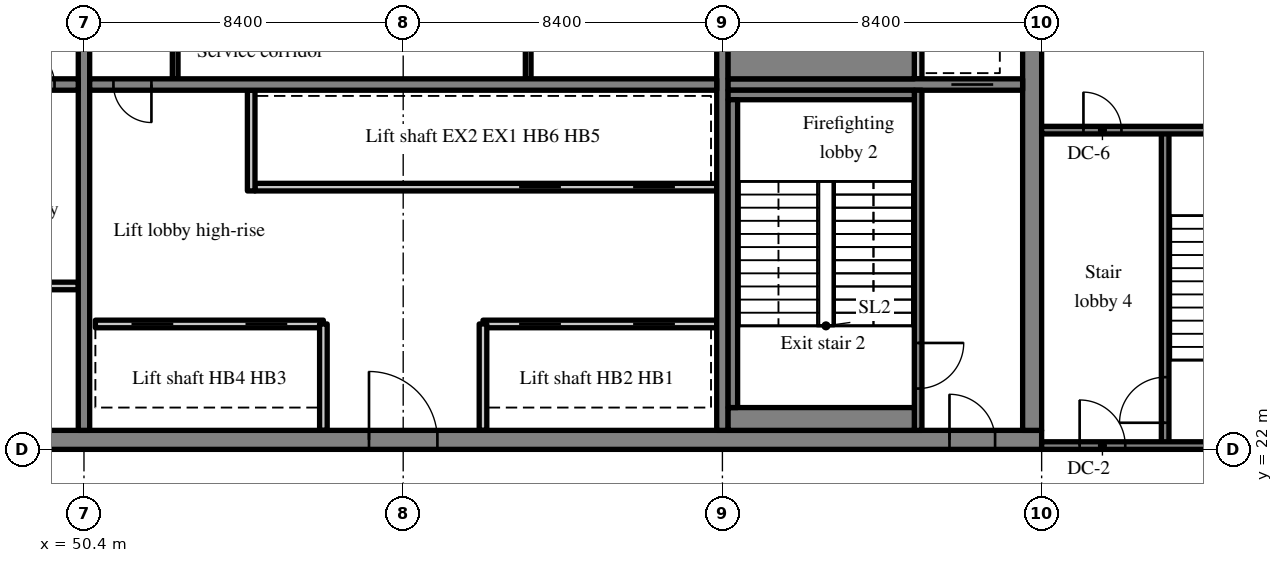
"""IFC4 building model, lengths in metres.
Left out: names, types, materials, properties, quantities, classifications, styles, units other than length and angle.
Written with IfcOpenShell. Run it as: python <this file> out.ifc"""

import sys

from ifc_helpers import new_model, si_unit, direction, frame, frame_2d, origin, place, context, subcontext, project, spatial, rectangle, extrude, source, transform, mapped, element, fill, save


model = new_model("IFC4")
c1 = context("Model", 3, precision=1e-05, world=origin(), true_north=direction((0.0, 1.0)))
c2 = subcontext(c1, "Body", "Model", "MODEL_VIEW")
j1 = project(units=[si_unit("LENGTHUNIT", "METRE"), si_unit("PLANEANGLEUNIT", "RADIAN")], contexts=[c1])
p1 = place(None, origin())
s1 = spatial("IfcSite", under=j1, at=p1, CompositionType="ELEMENT")
p2 = place(p1, origin())
s2 = spatial("IfcBuilding", under=s1, at=p2, CompositionType="ELEMENT")
p3 = place(p2, frame((0.0, 0.0, 313.7)))
s3 = spatial("IfcBuildingStorey", under=s2, at=p3, CompositionType="ELEMENT", Elevation=313.7)
m1 = source(origin(), c2, "Body", "SweptSolid", [
    extrude(rectangle(XDim=50.4, YDim=0.5, at=frame_2d((25.2, 0.0))), origin(), (0.0, 0.0, 1.0), 3.72),
])
p4 = place(p3, frame((25.2, 22.25, 0.0), z_axis=(0.0, 0.0, 1.0), x_axis=(1.0, 0.0, 0.0)))
e1 = element("IfcWall", 1, at=p4, inside=s3, PredefinedType="SHEAR", context=c2, shape_type="MappedRepresentation", body=[
    mapped(m1, transform((0.0, 0.0, 0.0), scale=1.0)),
])
m2 = source(origin(), c2, "Body", "SweptSolid", [
    extrude(rectangle(XDim=1.8, YDim=2.1, at=frame_2d((0.9, 1.05))), frame((0.0, 0.26, 0.0), z_axis=(0.0, -1.0, 0.0), x_axis=(1.0, 0.0, 0.0)), (0.0, 0.0, 1.0), 0.52),
])
p5 = place(p4, frame((15.9, 0.0, 0.0)))
e2 = element("IfcOpeningElement", 2, at=p5, cuts=e1, PredefinedType="OPENING", context=c2, shape_type="MappedRepresentation", body=[
    mapped(m2, transform((0.0, 0.0, 0.0), scale=1.0)),
])
m3 = source(origin(), c2, "Body", "SweptSolid", [
    extrude(rectangle(XDim=0.9, YDim=2.1, at=frame_2d((0.45, 1.05))), frame((0.0, 0.26, 0.0), z_axis=(0.0, -1.0, 0.0), x_axis=(1.0, 0.0, 0.0)), (0.0, 0.0, 1.0), 0.52),
])
p6 = place(p4, frame((9.675, 0.0, 0.0)))
e3 = element("IfcOpeningElement", 3, at=p6, cuts=e1, PredefinedType="OPENING", context=c2, shape_type="MappedRepresentation", body=[
    mapped(m3, transform((0.0, 0.0, 0.0), scale=1.0)),
])
p7 = place(p4, frame((21.525, 0.0, 0.0)))
e4 = element("IfcOpeningElement", 4, at=p7, cuts=e1, PredefinedType="OPENING", context=c2, shape_type="MappedRepresentation", body=[
    mapped(m3, transform((0.0, 0.0, 0.0), scale=1.0)),
])
p8 = place(p4, frame((32.7, 0.0, 0.0)))
e5 = element("IfcOpeningElement", 5, at=p8, cuts=e1, PredefinedType="OPENING", context=c2, shape_type="MappedRepresentation", body=[
    mapped(m2, transform((0.0, 0.0, 0.0), scale=1.0)),
])
m4 = source(origin(), c2, "Body", "SweptSolid", [
    extrude(rectangle(XDim=1.2, YDim=2.1, at=frame_2d((0.6, 1.05))), frame((0.0, 0.26, 0.0), z_axis=(0.0, -1.0, 0.0), x_axis=(1.0, 0.0, 0.0)), (0.0, 0.0, 1.0), 0.52),
])
p9 = place(p4, frame((6.5, 0.0, 0.0)))
e6 = element("IfcOpeningElement", 6, at=p9, cuts=e1, PredefinedType="OPENING", context=c2, shape_type="MappedRepresentation", body=[
    mapped(m4, transform((0.0, 0.0, 0.0), scale=1.0)),
])
p10 = place(p4, frame((47.975, 0.0, 0.0)))
e7 = element("IfcOpeningElement", 7, at=p10, cuts=e1, PredefinedType="OPENING", context=c2, shape_type="MappedRepresentation", body=[
    mapped(m4, transform((0.0, 0.0, 0.0), scale=1.0)),
])
m5 = source(origin(), c2, "Body", "SweptSolid", [
    extrude(rectangle(XDim=19.0, YDim=0.5, at=frame_2d((9.5, 0.0))), origin(), (0.0, 0.0, 1.0), 3.72),
])
p11 = place(p3, frame((75.35, 22.5, 0.0), z_axis=(0.0, 0.0, 1.0), x_axis=(0.0, 1.0, 0.0)))
e8 = element("IfcWall", 8, at=p11, inside=s3, PredefinedType="SHEAR", context=c2, shape_type="MappedRepresentation", body=[
    mapped(m5, transform((0.0, 0.0, 0.0), scale=1.0)),
])
p12 = place(p11, frame((12.9, 0.0, 0.0)))
e9 = element("IfcOpeningElement", 9, at=p12, cuts=e8, PredefinedType="OPENING", context=c2, shape_type="MappedRepresentation", body=[
    mapped(m4, transform((0.0, 0.0, 0.0), scale=1.0)),
])
m6 = source(origin(), c2, "Body", "SweptSolid", [
    extrude(rectangle(XDim=19.0, YDim=0.3, at=frame_2d((9.5, 0.0))), origin(), (0.0, 0.0, 1.0), 3.72),
])
p13 = place(p3, frame((50.4, 22.5, 0.0), z_axis=(0.0, 0.0, 1.0), x_axis=(0.0, 1.0, 0.0)))
e10 = element("IfcWall", 10, at=p13, inside=s3, PredefinedType="SHEAR", context=c2, shape_type="MappedRepresentation", body=[
    mapped(m6, transform((0.0, 0.0, 0.0), scale=1.0)),
])
m7 = source(origin(), c2, "Body", "SweptSolid", [
    extrude(rectangle(XDim=1.1, YDim=2.1, at=frame_2d((0.55, 1.05))), frame((0.0, 0.16, 0.0), z_axis=(0.0, -1.0, 0.0), x_axis=(1.0, 0.0, 0.0)), (0.0, 0.0, 1.0), 0.32),
])
p14 = place(p13, frame((12.95, 0.0, 0.0)))
e11 = element("IfcOpeningElement", 11, at=p14, cuts=e10, PredefinedType="OPENING", context=c2, shape_type="MappedRepresentation", body=[
    mapped(m7, transform((0.0, 0.0, 0.0), scale=1.0)),
])
p15 = place(p3, frame((67.2, 22.5, 0.0), z_axis=(0.0, 0.0, 1.0), x_axis=(0.0, 1.0, 0.0)))
e12 = element("IfcWall", 12, at=p15, inside=s3, PredefinedType="SHEAR", context=c2, shape_type="MappedRepresentation", body=[
    mapped(m6, transform((0.0, 0.0, 0.0), scale=1.0)),
])
m8 = source(origin(), c2, "Body", "SweptSolid", [
    extrude(rectangle(XDim=16.5, YDim=0.3, at=frame_2d((8.25, 0.0))), origin(), (0.0, 0.0, 1.0), 3.72),
])
p16 = place(p3, frame((33.75, 31.6, 0.0), z_axis=(0.0, 0.0, 1.0), x_axis=(1.0, 0.0, 0.0)))
e13 = element("IfcWall", 13, at=p16, inside=s3, PredefinedType="SHEAR", context=c2, shape_type="MappedRepresentation", body=[
    mapped(m8, transform((0.0, 0.0, 0.0), scale=1.0)),
])
m9 = source(origin(), c2, "Body", "SweptSolid", [
    extrude(rectangle(XDim=1.0, YDim=2.1, at=frame_2d((0.5, 1.05))), frame((0.0, 0.16, 0.0), z_axis=(0.0, -1.0, 0.0), x_axis=(1.0, 0.0, 0.0)), (0.0, 0.0, 1.0), 0.32),
])
p17 = place(p16, frame((14.875, 0.0, 0.0)))
e14 = element("IfcOpeningElement", 14, at=p17, cuts=e13, PredefinedType="OPENING", context=c2, shape_type="MappedRepresentation", body=[
    mapped(m9, transform((0.0, 0.0, 0.0), scale=1.0)),
])
p18 = place(p3, frame((50.55, 31.6, 0.0), z_axis=(0.0, 0.0, 1.0), x_axis=(1.0, 0.0, 0.0)))
e15 = element("IfcWall", 15, at=p18, inside=s3, PredefinedType="SHEAR", context=c2, shape_type="MappedRepresentation", body=[
    mapped(m8, transform((0.0, 0.0, 0.0), scale=1.0)),
])
p19 = place(p18, frame((0.625, 0.0, 0.0)))
e16 = element("IfcOpeningElement", 16, at=p19, cuts=e15, PredefinedType="OPENING", context=c2, shape_type="MappedRepresentation", body=[
    mapped(m9, transform((0.0, 0.0, 0.0), scale=1.0)),
])
m10 = source(origin(), c2, "Body", "SweptSolid", [
    extrude(rectangle(XDim=7.75, YDim=0.3, at=frame_2d((3.875, 0.0))), origin(), (0.0, 0.0, 1.0), 3.72),
])
p20 = place(p3, frame((67.35, 31.6, 0.0), z_axis=(0.0, 0.0, 1.0), x_axis=(1.0, 0.0, 0.0)))
e17 = element("IfcWall", 17, at=p20, inside=s3, PredefinedType="SHEAR", context=c2, shape_type="MappedRepresentation", body=[
    mapped(m10, transform((0.0, 0.0, 0.0), scale=1.0)),
])
p21 = place(p20, frame((5.875, 0.0, 0.0)))
e18 = element("IfcOpeningElement", 18, at=p21, cuts=e17, PredefinedType="OPENING", context=c2, shape_type="MappedRepresentation", body=[
    mapped(m7, transform((0.0, 0.0, 0.0), scale=1.0)),
])
m11 = source(origin(), c2, "Body", "SweptSolid", [
    extrude(rectangle(XDim=6.15, YDim=0.2, at=frame_2d((3.075, 0.0))), origin(), (0.0, 0.0, 1.0), 3.72),
])
p22 = place(p3, frame((44.1, 26.3, 0.0), z_axis=(0.0, 0.0, 1.0), x_axis=(1.0, 0.0, 0.0)))
e19 = element("IfcWall", 19, at=p22, inside=s3, PredefinedType="PARTITIONING", context=c2, shape_type="MappedRepresentation", body=[
    mapped(m11, transform((0.0, 0.0, 0.0), scale=1.0)),
])
m12 = source(origin(), c2, "Body", "SweptSolid", [
    extrude(rectangle(XDim=6.15, YDim=0.2, at=frame_2d((3.075, 0.0))), origin(), (0.0, 0.0, 1.0), 3.72),
])
p23 = place(p3, frame((67.05, 25.3, 0.0), z_axis=(0.0, 0.0, 1.0), x_axis=(-1.0, 0.0, 0.0)))
e20 = element("IfcWall", 20, at=p23, inside=s3, PredefinedType="SOLIDWALL", context=c2, shape_type="MappedRepresentation", body=[
    mapped(m12, transform((0.0, 0.0, 0.0), scale=1.0)),
])
m13 = source(origin(), c2, "Body", "SweptSolid", [
    extrude(rectangle(XDim=1.1, YDim=2.1, at=frame_2d((0.55, 1.05))), frame((0.0, 0.11, 0.0), z_axis=(0.0, -1.0, 0.0), x_axis=(1.0, 0.0, 0.0)), (0.0, 0.0, 1.0), 0.22),
])
p24 = place(p23, frame((1.1, 0.0, 0.0)))
e21 = element("IfcOpeningElement", 21, at=p24, cuts=e20, PredefinedType="OPENING", context=c2, shape_type="MappedRepresentation", body=[
    mapped(m13, transform((0.0, 0.0, 0.0), scale=1.0)),
])
p25 = place(p23, frame((4.1, 0.0, 0.0)))
e22 = element("IfcOpeningElement", 22, at=p25, cuts=e20, PredefinedType="OPENING", context=c2, shape_type="MappedRepresentation", body=[
    mapped(m13, transform((0.0, 0.0, 0.0), scale=1.0)),
])
m14 = source(origin(), c2, "Body", "SweptSolid", [
    extrude(rectangle(XDim=6.0, YDim=0.2, at=frame_2d((3.0, 0.0))), origin(), (0.0, 0.0, 1.0), 3.72),
])
p26 = place(p3, frame((56.7, 25.3, 0.0), z_axis=(0.0, 0.0, 1.0), x_axis=(-1.0, 0.0, 0.0)))
e23 = element("IfcWall", 23, at=p26, inside=s3, PredefinedType="SOLIDWALL", context=c2, shape_type="MappedRepresentation", body=[
    mapped(m14, transform((0.0, 0.0, 0.0), scale=1.0)),
])
p27 = place(p26, frame((0.95, 0.0, 0.0)))
e24 = element("IfcOpeningElement", 24, at=p27, cuts=e23, PredefinedType="OPENING", context=c2, shape_type="MappedRepresentation", body=[
    mapped(m13, transform((0.0, 0.0, 0.0), scale=1.0)),
])
p28 = place(p26, frame((3.95, 0.0, 0.0)))
e25 = element("IfcOpeningElement", 25, at=p28, cuts=e23, PredefinedType="OPENING", context=c2, shape_type="MappedRepresentation", body=[
    mapped(m13, transform((0.0, 0.0, 0.0), scale=1.0)),
])
m15 = source(origin(), c2, "Body", "SweptSolid", [
    extrude(rectangle(XDim=12.15, YDim=0.2, at=frame_2d((6.075, 0.0))), origin(), (0.0, 0.0, 1.0), 3.72),
])
p29 = place(p3, frame((67.05, 28.9, 0.0), z_axis=(0.0, 0.0, 1.0), x_axis=(-1.0, 0.0, 0.0)))
e26 = element("IfcWall", 26, at=p29, inside=s3, PredefinedType="SOLIDWALL", context=c2, shape_type="MappedRepresentation", body=[
    mapped(m15, transform((0.0, 0.0, 0.0), scale=1.0)),
])
p30 = place(p29, frame((1.1, 0.0, 0.0)))
e27 = element("IfcOpeningElement", 27, at=p30, cuts=e26, PredefinedType="OPENING", context=c2, shape_type="MappedRepresentation", body=[
    mapped(m13, transform((0.0, 0.0, 0.0), scale=1.0)),
])
p31 = place(p29, frame((4.1, 0.0, 0.0)))
e28 = element("IfcOpeningElement", 28, at=p31, cuts=e26, PredefinedType="OPENING", context=c2, shape_type="MappedRepresentation", body=[
    mapped(m13, transform((0.0, 0.0, 0.0), scale=1.0)),
])
m16 = source(origin(), c2, "Body", "SweptSolid", [
    extrude(rectangle(XDim=2.8, YDim=0.2, at=frame_2d((1.4, 0.0))), origin(), (0.0, 0.0, 1.0), 3.72),
])
for number, where, z_axis, x_axis in (
    (29, (60.9, 22.5, 0.0), (0.0, 0.0, 1.0), (0.0, 1.0, 0.0)),
    (30, (56.7, 22.5, 0.0), (0.0, 0.0, 1.0), (0.0, 1.0, 0.0)),
):
    element("IfcWall", number, at=place(p3, frame(where, z_axis=z_axis, x_axis=x_axis)), inside=s3, PredefinedType="SOLIDWALL", context=c2, shape_type="MappedRepresentation", body=[
        mapped(m16, transform((0.0, 0.0, 0.0), scale=1.0)),
    ])
m17 = source(origin(), c2, "Body", "SweptSolid", [
    extrude(rectangle(XDim=2.65, YDim=0.2, at=frame_2d((1.325, 0.0))), origin(), (0.0, 0.0, 1.0), 3.72),
])
p32 = place(p3, frame((54.8, 28.8, 0.0), z_axis=(0.0, 0.0, 1.0), x_axis=(0.0, 1.0, 0.0)))
e31 = element("IfcWall", 31, at=p32, inside=s3, PredefinedType="SOLIDWALL", context=c2, shape_type="MappedRepresentation", body=[
    mapped(m17, transform((0.0, 0.0, 0.0), scale=1.0)),
])
m18 = source(origin(), c2, "Body", "SweptSolid", [
    extrude(rectangle(XDim=3.25, YDim=0.15, at=frame_2d((1.625, 0.0))), origin(), (0.0, 0.0, 1.0), 3.72),
])
for number, where, z_axis, x_axis in (
    (32, (52.8, 31.75, 0.0), (0.0, 0.0, 1.0), (0.0, 1.0, 0.0)),
    (33, (62.089, 31.75, 0.0), (0.0, 0.0, 1.0), (0.0, 1.0, 0.0)),
):
    element("IfcWall", number, at=place(p3, frame(where, z_axis=z_axis, x_axis=x_axis)), inside=s3, PredefinedType="PARTITIONING", context=c2, shape_type="MappedRepresentation", body=[
        mapped(m18, transform((0.0, 0.0, 0.0), scale=1.0)),
    ])
m19 = source(origin(), c2, "Body", "SweptSolid", [
    extrude(rectangle(XDim=8.95, YDim=0.2, at=frame_2d((4.475, 0.0))), origin(), (0.0, 0.0, 1.0), 3.72),
])
p33 = place(p3, frame((72.35, 22.5, 0.0), z_axis=(0.0, 0.0, 1.0), x_axis=(0.0, 1.0, 0.0)))
e34 = element("IfcWall", 34, at=p33, inside=s3, PredefinedType="SOLIDWALL", context=c2, shape_type="MappedRepresentation", body=[
    mapped(m19, transform((0.0, 0.0, 0.0), scale=1.0)),
])
m20 = source(origin(), c2, "Body", "SweptSolid", [
    extrude(rectangle(XDim=1.2, YDim=2.1, at=frame_2d((0.6, 1.05))), frame((0.0, 0.11, 0.0), z_axis=(0.0, -1.0, 0.0), x_axis=(1.0, 0.0, 0.0)), (0.0, 0.0, 1.0), 0.22),
])
p34 = place(p33, frame((1.1, 0.0, 0.0)))
e35 = element("IfcOpeningElement", 35, at=p34, cuts=e34, PredefinedType="OPENING", context=c2, shape_type="MappedRepresentation", body=[
    mapped(m20, transform((0.0, 0.0, 0.0), scale=1.0)),
])
m21 = source(origin(), c2, "Body", "SweptSolid", [
    extrude(rectangle(XDim=1.85, YDim=0.2, at=frame_2d((0.925, 0.0))), origin(), (0.0, 0.0, 1.0), 3.72),
])
p35 = place(p3, frame((72.35, 31.75, 0.0), z_axis=(0.0, 0.0, 1.0), x_axis=(0.0, 1.0, 0.0)))
e36 = element("IfcWall", 36, at=p35, inside=s3, PredefinedType="SOLIDWALL", context=c2, shape_type="MappedRepresentation", body=[
    mapped(m21, transform((0.0, 0.0, 0.0), scale=1.0)),
])
m22 = source(origin(), c2, "Body", "SweptSolid", [
    extrude(rectangle(XDim=8.3, YDim=0.2, at=frame_2d((4.15, 0.0))), origin(), (0.0, 0.0, 1.0), 3.72),
])
p36 = place(p3, frame((78.85, 22.1, 0.0), z_axis=(0.0, 0.0, 1.0), x_axis=(0.0, 1.0, 0.0)))
e37 = element("IfcWall", 37, at=p36, inside=s3, PredefinedType="SOLIDWALL", context=c2, shape_type="MappedRepresentation", body=[
    mapped(m22, transform((0.0, 0.0, 0.0), scale=1.0)),
])
p37 = place(p36, frame((0.6, 0.0, 0.0)))
e38 = element("IfcOpeningElement", 38, at=p37, cuts=e37, PredefinedType="OPENING", context=c2, shape_type="MappedRepresentation", body=[
    mapped(m20, transform((0.0, 0.0, 0.0), scale=1.0)),
])
m23 = source(origin(), c2, "Body", "SweptSolid", [
    extrude(rectangle(XDim=8.15, YDim=0.2, at=frame_2d((4.075, 0.0))), origin(), (0.0, 0.0, 1.0), 3.72),
])
p38 = place(p3, frame((83.75, 22.1, 0.0), z_axis=(0.0, 0.0, 1.0), x_axis=(-1.0, 0.0, 0.0)))
e39 = element("IfcWall", 39, at=p38, inside=s3, PredefinedType="SOLIDWALL", context=c2, shape_type="MappedRepresentation", body=[
    mapped(m23, transform((0.0, 0.0, 0.0), scale=1.0)),
])
p39 = place(p38, frame((5.95, 0.0, 0.0)))
e40 = element("IfcOpeningElement", 40, at=p39, cuts=e39, PredefinedType="OPENING", context=c2, shape_type="MappedRepresentation", body=[
    mapped(m20, transform((0.0, 0.0, 0.0), scale=1.0)),
])
p40 = place(p3, frame((83.75, 30.4, 0.0), z_axis=(0.0, 0.0, 1.0), x_axis=(-1.0, 0.0, 0.0)))
e41 = element("IfcWall", 41, at=p40, inside=s3, PredefinedType="SOLIDWALL", context=c2, shape_type="MappedRepresentation", body=[
    mapped(m23, transform((0.0, 0.0, 0.0), scale=1.0)),
])
m24 = source(origin(), c2, "Body", "SweptSolid", [
    extrude(rectangle(XDim=1.0, YDim=2.1, at=frame_2d((0.5, 1.05))), frame((0.0, 0.11, 0.0), z_axis=(0.0, -1.0, 0.0), x_axis=(1.0, 0.0, 0.0)), (0.0, 0.0, 1.0), 0.22),
])
p41 = place(p40, frame((6.05, 0.0, 0.0)))
e42 = element("IfcOpeningElement", 42, at=p41, cuts=e41, PredefinedType="OPENING", context=c2, shape_type="MappedRepresentation", body=[
    mapped(m24, transform((0.0, 0.0, 0.0), scale=1.0)),
])
m25 = source(origin(), c2, "Body", "SweptSolid", [
    extrude(rectangle(XDim=4.9, YDim=0.6, at=frame_2d((2.45, 0.0))), origin(), (0.0, 0.0, 1.0), 3.72),
])
p42 = place(p3, frame((67.35, 22.8, 0.0), z_axis=(0.0, 0.0, 1.0), x_axis=(1.0, 0.0, 0.0)))
e43 = element("IfcWall", 43, at=p42, inside=s3, PredefinedType="SOLIDWALL", context=c2, shape_type="MappedRepresentation", body=[
    mapped(m25, transform((0.0, 0.0, 0.0), scale=1.0)),
])
m26 = source(origin(), c2, "Body", "SweptSolid", [
    extrude(rectangle(XDim=4.9, YDim=0.25, at=frame_2d((2.45, 0.0))), origin(), (0.0, 0.0, 1.0), 3.72),
])
p43 = place(p3, frame((67.35, 31.325, 0.0), z_axis=(0.0, 0.0, 1.0), x_axis=(1.0, 0.0, 0.0)))
e44 = element("IfcWall", 44, at=p43, inside=s3, PredefinedType="SOLIDWALL", context=c2, shape_type="MappedRepresentation", body=[
    mapped(m26, transform((0.0, 0.0, 0.0), scale=1.0)),
])
m27 = source(origin(), c2, "Body", "SweptSolid", [
    extrude(rectangle(XDim=8.1, YDim=0.25, at=frame_2d((4.05, 0.0))), origin(), (0.0, 0.0, 1.0), 3.72),
])
p44 = place(p3, frame((67.475, 23.1, 0.0), z_axis=(0.0, 0.0, 1.0), x_axis=(0.0, 1.0, 0.0)))
e45 = element("IfcWall", 45, at=p44, inside=s3, PredefinedType="SOLIDWALL", context=c2, shape_type="MappedRepresentation", body=[
    mapped(m27, transform((0.0, 0.0, 0.0), scale=1.0)),
])
m28 = source(origin(), c2, "Body", "SweptSolid", [
    extrude(rectangle(XDim=4.9, YDim=1.05, at=frame_2d((2.45, 0.0))), origin(), (0.0, 0.0, 1.0), 3.72),
])
p45 = place(p3, frame((67.35, 32.275, 0.0), z_axis=(0.0, 0.0, 1.0), x_axis=(1.0, 0.0, 0.0)))
e46 = element("IfcWall", 46, at=p45, inside=s3, PredefinedType="SOLIDWALL", context=c2, shape_type="MappedRepresentation", body=[
    mapped(m28, transform((0.0, 0.0, 0.0), scale=1.0)),
])
m29 = source(origin(), c2, "Body", "SweptSolid", [
    extrude(rectangle(XDim=1.0, YDim=2.1, at=frame_2d((0.5, 1.05))), frame((0.0, 0.025, 0.0), z_axis=(0.0, -1.0, 0.0), x_axis=(1.0, 0.0, 0.0)), (0.0, 0.0, 1.0), 0.05),
])
p46 = place(p17, origin())
e47 = element("IfcDoor", 47, at=p46, inside=s3, OperationType="SINGLE_SWING_LEFT", PredefinedType="DOOR", context=c2, shape_type="MappedRepresentation", body=[
    mapped(m29, transform((0.0, 0.0, 0.0), scale=1.0)),
])
fill(e14, e47)
m30 = source(origin(), c2, "Body", "SweptSolid", [
    extrude(rectangle(XDim=1.8, YDim=2.1, at=frame_2d((0.9, 1.05))), frame((0.0, 0.175, 0.0), z_axis=(0.0, -1.0, 0.0), x_axis=(1.0, 0.0, 0.0)), (0.0, 0.0, 1.0), 0.05),
])
p47 = place(p8, origin())
e48 = element("IfcDoor", 48, at=p47, inside=s3, OperationType="DOUBLE_DOOR_SINGLE_SWING", PredefinedType="DOOR", context=c2, shape_type="MappedRepresentation", body=[
    mapped(m30, transform((0.0, 0.0, 0.0), scale=1.0)),
])
fill(e5, e48)
p48 = place(p19, origin())
e49 = element("IfcDoor", 49, at=p48, inside=s3, OperationType="SINGLE_SWING_RIGHT", PredefinedType="DOOR", context=c2, shape_type="MappedRepresentation", body=[
    mapped(m29, transform((0.0, 0.0, 0.0), scale=1.0)),
])
fill(e16, e49)
m31 = source(origin(), c2, "Body", "SweptSolid", [
    extrude(rectangle(XDim=1.1, YDim=2.1, at=frame_2d((0.55, 1.05))), frame((0.0, 0.025, 0.0), z_axis=(0.0, -1.0, 0.0), x_axis=(1.0, 0.0, 0.0)), (0.0, 0.0, 1.0), 0.05),
])
p49 = place(p24, origin())
e50 = element("IfcDoor", 50, at=p49, inside=s3, OperationType="SLIDING_TO_RIGHT", PredefinedType="DOOR", context=c2, shape_type="MappedRepresentation", body=[
    mapped(m31, transform((0.0, 0.0, 0.0), scale=1.0)),
])
fill(e21, e50)
p50 = place(p25, origin())
e51 = element("IfcDoor", 51, at=p50, inside=s3, OperationType="SLIDING_TO_LEFT", PredefinedType="DOOR", context=c2, shape_type="MappedRepresentation", body=[
    mapped(m31, transform((0.0, 0.0, 0.0), scale=1.0)),
])
fill(e22, e51)
p51 = place(p27, origin())
e52 = element("IfcDoor", 52, at=p51, inside=s3, OperationType="SLIDING_TO_RIGHT", PredefinedType="DOOR", context=c2, shape_type="MappedRepresentation", body=[
    mapped(m31, transform((0.0, 0.0, 0.0), scale=1.0)),
])
fill(e24, e52)
p52 = place(p28, origin())
e53 = element("IfcDoor", 53, at=p52, inside=s3, OperationType="SLIDING_TO_LEFT", PredefinedType="DOOR", context=c2, shape_type="MappedRepresentation", body=[
    mapped(m31, transform((0.0, 0.0, 0.0), scale=1.0)),
])
fill(e25, e53)
p53 = place(p30, origin())
e54 = element("IfcDoor", 54, at=p53, inside=s3, OperationType="SLIDING_TO_RIGHT", PredefinedType="DOOR", context=c2, shape_type="MappedRepresentation", body=[
    mapped(m31, transform((0.0, 0.0, 0.0), scale=1.0)),
])
fill(e27, e54)
p54 = place(p31, origin())
e55 = element("IfcDoor", 55, at=p54, inside=s3, OperationType="SLIDING_TO_LEFT", PredefinedType="DOOR", context=c2, shape_type="MappedRepresentation", body=[
    mapped(m31, transform((0.0, 0.0, 0.0), scale=1.0)),
])
fill(e28, e55)
m32 = source(origin(), c2, "Body", "SweptSolid", [
    extrude(rectangle(XDim=1.2, YDim=2.1, at=frame_2d((0.6, 1.05))), frame((0.0, 0.025, 0.0), z_axis=(0.0, -1.0, 0.0), x_axis=(1.0, 0.0, 0.0)), (0.0, 0.0, 1.0), 0.05),
])
p55 = place(p34, origin())
e56 = element("IfcDoor", 56, at=p55, inside=s3, OperationType="SINGLE_SWING_RIGHT", PredefinedType="DOOR", context=c2, shape_type="MappedRepresentation", body=[
    mapped(m32, transform((0.0, 0.0, 0.0), scale=1.0)),
])
fill(e35, e56)
m33 = source(origin(), c2, "Body", "SweptSolid", [
    extrude(rectangle(XDim=1.2, YDim=2.1, at=frame_2d((0.6, 1.05))), frame((0.0, 0.175, 0.0), z_axis=(0.0, -1.0, 0.0), x_axis=(1.0, 0.0, 0.0)), (0.0, 0.0, 1.0), 0.05),
])
p56 = place(p10, origin())
e57 = element("IfcDoor", 57, at=p56, inside=s3, OperationType="SINGLE_SWING_LEFT", PredefinedType="DOOR", context=c2, shape_type="MappedRepresentation", body=[
    mapped(m33, transform((0.0, 0.0, 0.0), scale=1.0)),
])
fill(e7, e57)
p57 = place(p21, origin())
e58 = element("IfcDoor", 58, at=p57, inside=s3, OperationType="SLIDING_TO_RIGHT", PredefinedType="DOOR", context=c2, shape_type="MappedRepresentation", body=[
    mapped(m31, transform((0.0, 0.0, 0.0), scale=1.0)),
])
fill(e18, e58)
p58 = place(p37, origin())
e59 = element("IfcDoor", 59, at=p58, inside=s3, OperationType="SINGLE_SWING_LEFT", PredefinedType="DOOR", context=c2, shape_type="MappedRepresentation", body=[
    mapped(m32, transform((0.0, 0.0, 0.0), scale=1.0)),
])
fill(e38, e59)
p59 = place(p39, origin())
e60 = element("IfcDoor", 60, at=p59, inside=s3, OperationType="SINGLE_SWING_RIGHT", PredefinedType="DOOR", context=c2, shape_type="MappedRepresentation", body=[
    mapped(m32, transform((0.0, 0.0, 0.0), scale=1.0)),
])
fill(e40, e60)
p60 = place(p41, origin())
e61 = element("IfcDoor", 61, at=p60, inside=s3, OperationType="SINGLE_SWING_RIGHT", PredefinedType="DOOR", context=c2, shape_type="MappedRepresentation", body=[
    mapped(m29, transform((0.0, 0.0, 0.0), scale=1.0)),
])
fill(e42, e61)
save(model, sys.argv[1])
